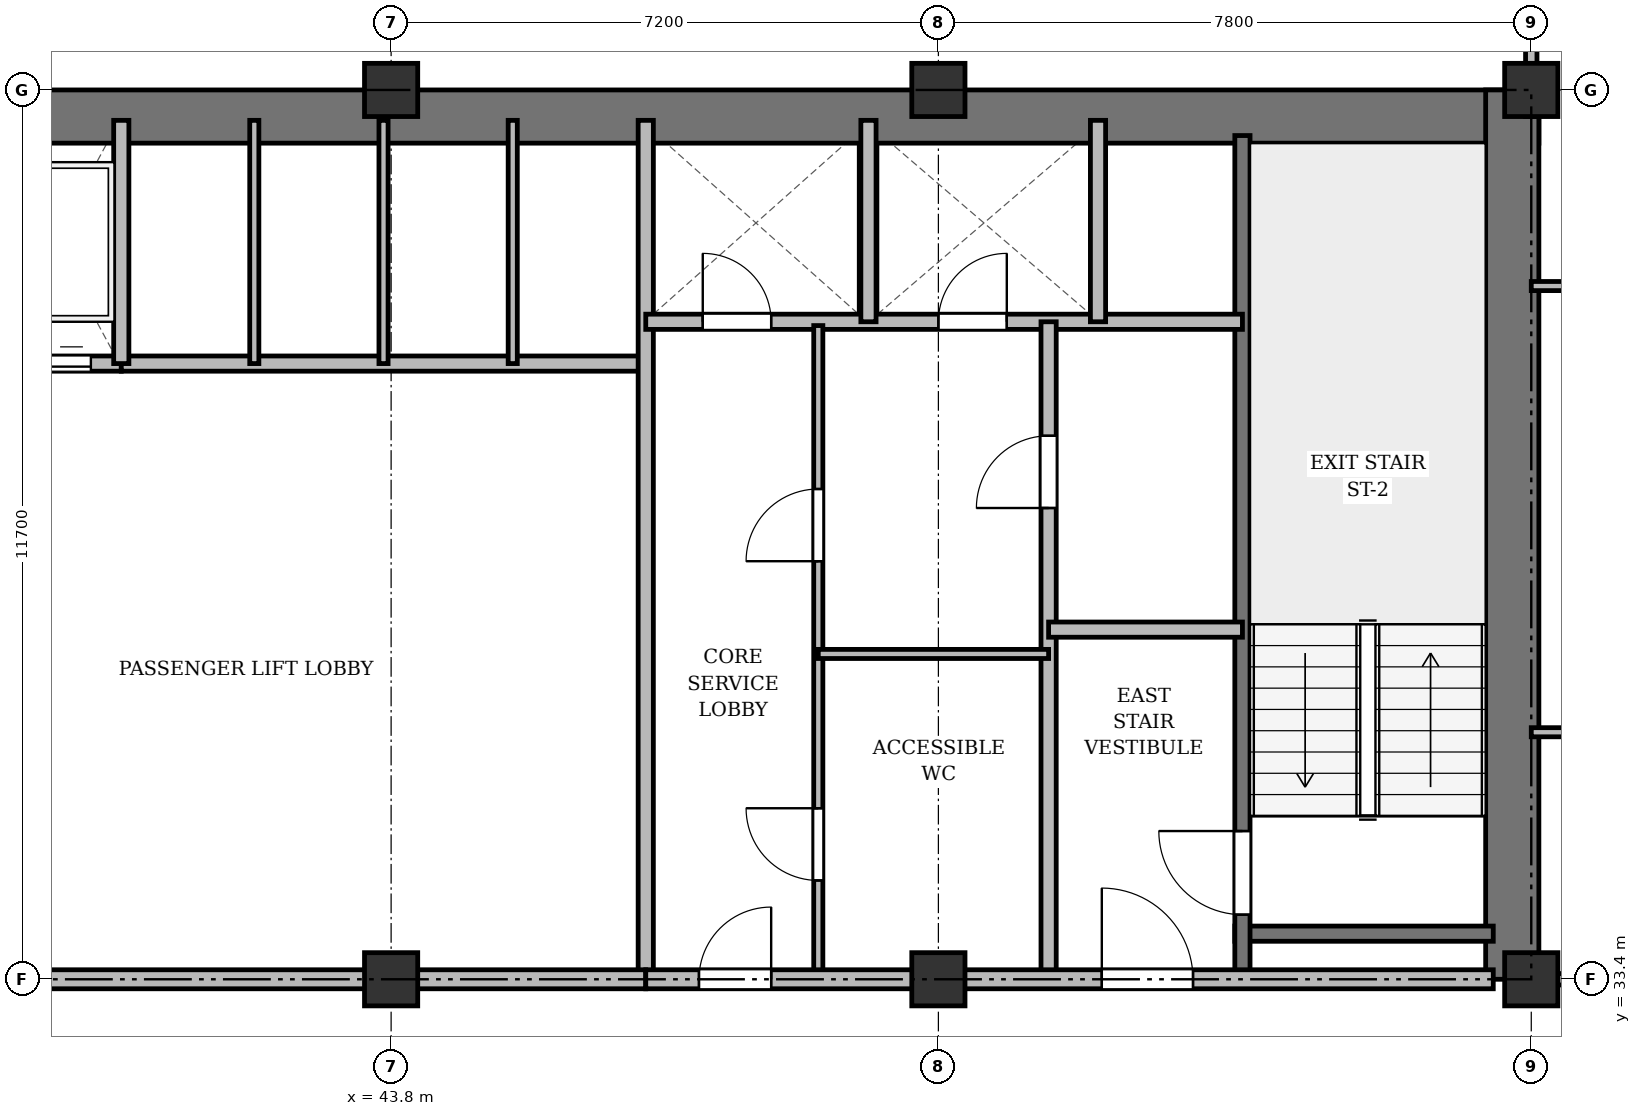
"""IFC4 building model, lengths in metres.
Left out: names, types, materials, properties, quantities, classifications, styles, units other than length and angle.
Written with IfcOpenShell. Run it as: python <this file> out.ifc"""

import sys

from ifc_helpers import new_model, si_unit, direction, frame, frame_2d, origin, origin_2d, place, context, subcontext, project, spatial, rectangle, extrude, source, transform, mapped, element, fill, save


model = new_model("IFC4")
c1 = context("Model", 3, precision=1e-05, world=origin(), true_north=direction((0.0, 1.0)))
c2 = subcontext(c1, "Body", "Model", "MODEL_VIEW")
j1 = project(units=[si_unit("LENGTHUNIT", "METRE"), si_unit("PLANEANGLEUNIT", "RADIAN")], contexts=[c1])
p1 = place(None, origin())
s1 = spatial("IfcSite", under=j1, at=p1, CompositionType="ELEMENT")
p2 = place(p1, origin())
s2 = spatial("IfcBuilding", under=s1, at=p2, CompositionType="ELEMENT")
p3 = place(p2, frame((0.0, 0.0, 135.7)))
s3 = spatial("IfcBuildingStorey", under=s2, at=p3, CompositionType="ELEMENT", Elevation=135.7)
m1 = source(origin(), c2, "Body", "SweptSolid", [
    extrude(rectangle(XDim=0.7, YDim=0.7, at=origin_2d()), origin(), (0.0, 0.0, 1.0), 3.6),
])
for number, where, z_axis, x_axis in (
    (1, (43.8, 33.4, 0.0), (0.0, 0.0, 1.0), (1.0, 0.0, 0.0)),
    (2, (43.8, 45.1, 0.0), (0.0, 0.0, 1.0), (1.0, 0.0, 0.0)),
    (3, (51.0, 33.4, 0.0), (0.0, 0.0, 1.0), (1.0, 0.0, 0.0)),
    (4, (51.0, 45.1, 0.0), (0.0, 0.0, 1.0), (1.0, 0.0, 0.0)),
    (5, (58.8, 33.4, 0.0), (0.0, 0.0, 1.0), (1.0, 0.0, 0.0)),
    (6, (58.8, 45.1, 0.0), (0.0, 0.0, 1.0), (1.0, 0.0, 0.0)),
):
    element("IfcColumn", number, at=place(p3, frame(where, z_axis=z_axis, x_axis=x_axis)), inside=s3, PredefinedType="COLUMN", context=c2, shape_type="MappedRepresentation", body=[
        mapped(m1, transform((0.0, 0.0, 0.0), x_axis=(1.0, 0.0, 0.0), y_axis=(0.0, 1.0, 0.0), z_axis=(0.0, 0.0, 1.0), scale=1.0)),
    ])
p4 = place(p3, frame((15.5, 44.75, 0.0), z_axis=(0.0, 0.0, 1.0), x_axis=(1.0, 0.0, 0.0)))
e7 = element("IfcWall", 7, at=p4, inside=s3, PredefinedType="SHEAR", context=c2, shape_type="SweptSolid", body=[
    extrude(rectangle(XDim=43.4, YDim=0.7, at=frame_2d((21.7, 0.0))), origin(), (0.0, 0.0, 1.0), 3.35),
])
p5 = place(p3, frame((58.55, 33.4, 0.0), z_axis=(0.0, 0.0, 1.0), x_axis=(0.0, 1.0, 0.0)))
e8 = element("IfcWall", 8, at=p5, inside=s3, PredefinedType="SHEAR", context=c2, shape_type="SweptSolid", body=[
    extrude(rectangle(XDim=11.7, YDim=0.7, at=frame_2d((5.85, 0.0))), origin(), (0.0, 0.0, 1.0), 3.35),
])
p6 = place(p3, frame((54.9, 34.0, 0.0), z_axis=(0.0, 0.0, 1.0), x_axis=(1.0, 0.0, 0.0)))
e9 = element("IfcWall", 9, at=p6, inside=s3, PredefinedType="SHEAR", context=c2, shape_type="SweptSolid", body=[
    extrude(rectangle(XDim=3.4, YDim=0.2, at=frame_2d((1.7, 0.0))), origin(), (0.0, 0.0, 1.0), 3.35),
])
p7 = place(p3, frame((55.0, 33.4, 0.0), z_axis=(0.0, 0.0, 1.0), x_axis=(0.0, 1.0, 0.0)))
e10 = element("IfcWall", 10, at=p7, inside=s3, PredefinedType="SHEAR", context=c2, shape_type="SweptSolid", body=[
    extrude(rectangle(XDim=11.1, YDim=0.2, at=frame_2d((5.55, 0.0))), origin(), (0.0, 0.0, 1.0), 3.35),
])
p8 = place(p7, frame((0.85, 0.0, 0.0)))
e11 = element("IfcOpeningElement", 11, at=p8, cuts=e10, PredefinedType="OPENING", context=c2, shape_type="SweptSolid", body=[
    extrude(rectangle(XDim=1.1, YDim=2.15, at=frame_2d((0.55, 1.075))), frame((0.0, 0.11, 0.0), z_axis=(0.0, -1.0, 0.0), x_axis=(1.0, 0.0, 0.0)), (0.0, 0.0, 1.0), 0.22),
])
p9 = place(p3, frame((33.35, 41.5, 0.0), z_axis=(0.0, 0.0, 1.0), x_axis=(1.0, 0.0, 0.0)))
e12 = element("IfcWall", 12, at=p9, inside=s3, PredefinedType="SOLIDWALL", context=c2, shape_type="SweptSolid", body=[
    extrude(rectangle(XDim=6.9, YDim=0.2, at=frame_2d((3.45, 0.0))), origin(), (0.0, 0.0, 1.0), 3.35),
])
p10 = place(p9, frame((0.35, 0.0, 0.0)))
e13 = element("IfcOpeningElement", 13, at=p10, cuts=e12, PredefinedType="OPENING", context=c2, shape_type="SweptSolid", body=[
    extrude(rectangle(XDim=1.05, YDim=2.15, at=frame_2d((0.525, 1.075))), frame((0.0, 0.11, 0.0), z_axis=(0.0, -1.0, 0.0), x_axis=(1.0, 0.0, 0.0)), (0.0, 0.0, 1.0), 0.22),
])
p11 = place(p9, frame((2.05, 0.0, 0.0)))
e14 = element("IfcOpeningElement", 14, at=p11, cuts=e12, PredefinedType="OPENING", context=c2, shape_type="SweptSolid", body=[
    extrude(rectangle(XDim=1.05, YDim=2.15, at=frame_2d((0.525, 1.075))), frame((0.0, 0.11, 0.0), z_axis=(0.0, -1.0, 0.0), x_axis=(1.0, 0.0, 0.0)), (0.0, 0.0, 1.0), 0.22),
])
p12 = place(p9, frame((3.75, 0.0, 0.0)))
e15 = element("IfcOpeningElement", 15, at=p12, cuts=e12, PredefinedType="OPENING", context=c2, shape_type="SweptSolid", body=[
    extrude(rectangle(XDim=1.05, YDim=2.15, at=frame_2d((0.525, 1.075))), frame((0.0, 0.11, 0.0), z_axis=(0.0, -1.0, 0.0), x_axis=(1.0, 0.0, 0.0)), (0.0, 0.0, 1.0), 0.22),
])
p13 = place(p9, frame((5.45, 0.0, 0.0)))
e16 = element("IfcOpeningElement", 16, at=p13, cuts=e12, PredefinedType="OPENING", context=c2, shape_type="SweptSolid", body=[
    extrude(rectangle(XDim=1.05, YDim=2.15, at=frame_2d((0.525, 1.075))), frame((0.0, 0.11, 0.0), z_axis=(0.0, -1.0, 0.0), x_axis=(1.0, 0.0, 0.0)), (0.0, 0.0, 1.0), 0.22),
])
p14 = place(p3, frame((40.25, 41.5, 0.0), z_axis=(0.0, 0.0, 1.0), x_axis=(1.0, 0.0, 0.0)))
e17 = element("IfcWall", 17, at=p14, inside=s3, PredefinedType="SOLIDWALL", context=c2, shape_type="SweptSolid", body=[
    extrude(rectangle(XDim=6.9, YDim=0.2, at=frame_2d((3.45, 0.0))), origin(), (0.0, 0.0, 1.0), 2.85),
])
p15 = place(p3, frame((40.25, 41.5, 0.0), z_axis=(0.0, 0.0, 1.0), x_axis=(0.0, 1.0, 0.0)))
e18 = element("IfcWall", 18, at=p15, inside=s3, PredefinedType="SOLIDWALL", context=c2, shape_type="SweptSolid", body=[
    extrude(rectangle(XDim=3.2, YDim=0.2, at=frame_2d((1.6, 0.0))), origin(), (0.0, 0.0, 1.0), 3.35),
])
p16 = place(p3, frame((42.0, 41.5, 0.0), z_axis=(0.0, 0.0, 1.0), x_axis=(0.0, 1.0, 0.0)))
e19 = element("IfcWall", 19, at=p16, inside=s3, PredefinedType="PARTITIONING", context=c2, shape_type="SweptSolid", body=[
    extrude(rectangle(XDim=3.2, YDim=0.12, at=frame_2d((1.6, 0.0))), origin(), (0.0, 0.0, 1.0), 3.35),
])
p17 = place(p3, frame((43.7, 41.5, 0.0), z_axis=(0.0, 0.0, 1.0), x_axis=(0.0, 1.0, 0.0)))
e20 = element("IfcWall", 20, at=p17, inside=s3, PredefinedType="PARTITIONING", context=c2, shape_type="SweptSolid", body=[
    extrude(rectangle(XDim=3.2, YDim=0.12, at=frame_2d((1.6, 0.0))), origin(), (0.0, 0.0, 1.0), 2.85),
])
p18 = place(p3, frame((45.4, 41.5, 0.0), z_axis=(0.0, 0.0, 1.0), x_axis=(0.0, 1.0, 0.0)))
e21 = element("IfcWall", 21, at=p18, inside=s3, PredefinedType="PARTITIONING", context=c2, shape_type="SweptSolid", body=[
    extrude(rectangle(XDim=3.2, YDim=0.12, at=frame_2d((1.6, 0.0))), origin(), (0.0, 0.0, 1.0), 3.35),
])
p19 = place(p3, frame((47.15, 33.4, 0.0), z_axis=(0.0, 0.0, 1.0), x_axis=(0.0, 1.0, 0.0)))
e22 = element("IfcWall", 22, at=p19, inside=s3, PredefinedType="SOLIDWALL", context=c2, shape_type="SweptSolid", body=[
    extrude(rectangle(XDim=11.3, YDim=0.2, at=frame_2d((5.65, 0.0))), origin(), (0.0, 0.0, 1.0), 2.75),
])
p20 = place(p3, frame((33.3, 33.4, 0.0), z_axis=(0.0, 0.0, 1.0), x_axis=(1.0, 0.0, 0.0)))
e23 = element("IfcWall", 23, at=p20, inside=s3, PredefinedType="PARTITIONING", context=c2, shape_type="SweptSolid", body=[
    extrude(rectangle(XDim=13.85, YDim=0.25, at=frame_2d((6.925, 0.0))), origin(), (0.0, 0.0, 1.0), 2.75),
])
p21 = place(p20, frame((4.2, 0.0, 0.0)))
e24 = element("IfcOpeningElement", 24, at=p21, cuts=e23, PredefinedType="OPENING", context=c2, shape_type="SweptSolid", body=[
    extrude(rectangle(XDim=1.6, YDim=2.2, at=frame_2d((0.8, 1.1))), frame((0.0, 0.135, 0.0), z_axis=(0.0, -1.0, 0.0), x_axis=(1.0, 0.0, 0.0)), (0.0, 0.0, 1.0), 0.27),
])
p22 = place(p3, frame((47.15, 42.05, 0.0), z_axis=(0.0, 0.0, 1.0), x_axis=(1.0, 0.0, 0.0)))
e25 = element("IfcWall", 25, at=p22, inside=s3, PredefinedType="SOLIDWALL", context=c2, shape_type="SweptSolid", body=[
    extrude(rectangle(XDim=7.85, YDim=0.2, at=frame_2d((3.925, 0.0))), origin(), (0.0, 0.0, 1.0), 2.85),
])
p23 = place(p22, frame((0.75, 0.0, 0.0)))
e26 = element("IfcOpeningElement", 26, at=p23, cuts=e25, PredefinedType="OPENING", context=c2, shape_type="SweptSolid", body=[
    extrude(rectangle(XDim=0.9, YDim=2.1, at=frame_2d((0.45, 1.05))), frame((0.0, 0.11, 0.0), z_axis=(0.0, -1.0, 0.0), x_axis=(1.0, 0.0, 0.0)), (0.0, 0.0, 1.0), 0.22),
])
p24 = place(p22, frame((3.85, 0.0, 0.0)))
e27 = element("IfcOpeningElement", 27, at=p24, cuts=e25, PredefinedType="OPENING", context=c2, shape_type="SweptSolid", body=[
    extrude(rectangle(XDim=0.9, YDim=2.1, at=frame_2d((0.45, 1.05))), frame((0.0, 0.11, 0.0), z_axis=(0.0, -1.0, 0.0), x_axis=(1.0, 0.0, 0.0)), (0.0, 0.0, 1.0), 0.22),
])
for number, where, z_axis, x_axis in (
    (28, (50.08, 42.05, 0.0), (0.0, 0.0, 1.0), (0.0, 1.0, 0.0)),
    (29, (53.1, 42.05, 0.0), (0.0, 0.0, 1.0), (0.0, 1.0, 0.0)),
):
    element("IfcWall", number, at=place(p3, frame(where, z_axis=z_axis, x_axis=x_axis)), inside=s3, PredefinedType="SOLIDWALL", context=c2, shape_type="SweptSolid", body=[
        extrude(rectangle(XDim=2.65, YDim=0.2, at=frame_2d((1.325, 0.0))), origin(), (0.0, 0.0, 1.0), 3.35),
    ])
p25 = place(p3, frame((52.45, 33.4, 0.0), z_axis=(0.0, 0.0, 1.0), x_axis=(0.0, 1.0, 0.0)))
e30 = element("IfcWall", 30, at=p25, inside=s3, PredefinedType="PARTITIONING", context=c2, shape_type="SweptSolid", body=[
    extrude(rectangle(XDim=8.65, YDim=0.2, at=frame_2d((4.325, 0.0))), origin(), (0.0, 0.0, 1.0), 2.75),
])
p26 = place(p25, frame((6.2, 0.0, 0.0)))
e31 = element("IfcOpeningElement", 31, at=p26, cuts=e30, PredefinedType="OPENING", context=c2, shape_type="SweptSolid", body=[
    extrude(rectangle(XDim=0.95, YDim=2.15, at=frame_2d((0.475, 1.075))), frame((0.0, 0.11, 0.0), z_axis=(0.0, -1.0, 0.0), x_axis=(1.0, 0.0, 0.0)), (0.0, 0.0, 1.0), 0.22),
])
p27 = place(p3, frame((52.45, 38.0, 0.0), z_axis=(0.0, 0.0, 1.0), x_axis=(1.0, 0.0, 0.0)))
e32 = element("IfcWall", 32, at=p27, inside=s3, PredefinedType="PARTITIONING", context=c2, shape_type="SweptSolid", body=[
    extrude(rectangle(XDim=2.55, YDim=0.2, at=frame_2d((1.275, 0.0))), origin(), (0.0, 0.0, 1.0), 3.35),
])
p28 = place(p3, frame((49.42, 33.4, 0.0), z_axis=(0.0, 0.0, 1.0), x_axis=(0.0, 1.0, 0.0)))
e33 = element("IfcWall", 33, at=p28, inside=s3, PredefinedType="PARTITIONING", context=c2, shape_type="SweptSolid", body=[
    extrude(rectangle(XDim=8.6, YDim=0.12, at=frame_2d((4.3, 0.0))), origin(), (0.0, 0.0, 1.0), 2.75),
])
p29 = place(p28, frame((1.3, 0.0, 0.0)))
e34 = element("IfcOpeningElement", 34, at=p29, cuts=e33, PredefinedType="OPENING", context=c2, shape_type="SweptSolid", body=[
    extrude(rectangle(XDim=0.95, YDim=2.15, at=frame_2d((0.475, 1.075))), frame((0.0, 0.07, 0.0), z_axis=(0.0, -1.0, 0.0), x_axis=(1.0, 0.0, 0.0)), (0.0, 0.0, 1.0), 0.14),
])
p30 = place(p28, frame((5.5, 0.0, 0.0)))
e35 = element("IfcOpeningElement", 35, at=p30, cuts=e33, PredefinedType="OPENING", context=c2, shape_type="SweptSolid", body=[
    extrude(rectangle(XDim=0.95, YDim=2.15, at=frame_2d((0.475, 1.075))), frame((0.0, 0.07, 0.0), z_axis=(0.0, -1.0, 0.0), x_axis=(1.0, 0.0, 0.0)), (0.0, 0.0, 1.0), 0.14),
])
p31 = place(p3, frame((49.42, 37.68, 0.0), z_axis=(0.0, 0.0, 1.0), x_axis=(1.0, 0.0, 0.0)))
e36 = element("IfcWall", 36, at=p31, inside=s3, PredefinedType="PARTITIONING", context=c2, shape_type="SweptSolid", body=[
    extrude(rectangle(XDim=3.03, YDim=0.12, at=frame_2d((1.515, 0.0))), origin(), (0.0, 0.0, 1.0), 2.85),
])
p32 = place(p3, frame((47.15, 33.4, 0.0), z_axis=(0.0, 0.0, 1.0), x_axis=(1.0, 0.0, 0.0)))
e37 = element("IfcWall", 37, at=p32, inside=s3, PredefinedType="PARTITIONING", context=c2, shape_type="SweptSolid", body=[
    extrude(rectangle(XDim=11.15, YDim=0.25, at=frame_2d((5.575, 0.0))), origin(), (0.0, 0.0, 1.0), 2.75),
])
p33 = place(p32, frame((0.7, 0.0, 0.0)))
e38 = element("IfcOpeningElement", 38, at=p33, cuts=e37, PredefinedType="OPENING", context=c2, shape_type="SweptSolid", body=[
    extrude(rectangle(XDim=0.95, YDim=2.15, at=frame_2d((0.475, 1.075))), frame((0.0, 0.135, 0.0), z_axis=(0.0, -1.0, 0.0), x_axis=(1.0, 0.0, 0.0)), (0.0, 0.0, 1.0), 0.27),
])
p34 = place(p32, frame((6.0, 0.0, 0.0)))
e39 = element("IfcOpeningElement", 39, at=p34, cuts=e37, PredefinedType="OPENING", context=c2, shape_type="SweptSolid", body=[
    extrude(rectangle(XDim=1.2, YDim=2.15, at=frame_2d((0.6, 1.075))), frame((0.0, 0.135, 0.0), z_axis=(0.0, -1.0, 0.0), x_axis=(1.0, 0.0, 0.0)), (0.0, 0.0, 1.0), 0.27),
])
p35 = place(p3, frame((58.8, 36.65, 0.0), z_axis=(0.0, 0.0, 1.0), x_axis=(1.0, 0.0, 0.0)))
e40 = element("IfcWall", 40, at=p35, inside=s3, PredefinedType="PARTITIONING", context=c2, shape_type="SweptSolid", body=[
    extrude(rectangle(XDim=2.45, YDim=0.12, at=frame_2d((1.225, 0.0))), origin(), (0.0, 0.0, 1.0), 2.85),
])
p36 = place(p3, frame((58.8, 42.52, 0.0), z_axis=(0.0, 0.0, 1.0), x_axis=(1.0, 0.0, 0.0)))
e41 = element("IfcWall", 41, at=p36, inside=s3, PredefinedType="PARTITIONING", context=c2, shape_type="SweptSolid", body=[
    extrude(rectangle(XDim=3.775, YDim=0.12, at=frame_2d((1.887, 0.0))), origin(), (0.0, 0.0, 1.0), 2.85),
])
p37 = place(p36, frame((1.506, 0.0, 0.0)))
e42 = element("IfcOpeningElement", 42, at=p37, cuts=e41, PredefinedType="OPENING", context=c2, shape_type="SweptSolid", body=[
    extrude(rectangle(XDim=0.95, YDim=2.15, at=frame_2d((0.475, 1.075))), frame((0.0, 0.07, 0.0), z_axis=(0.0, -1.0, 0.0), x_axis=(1.0, 0.0, 0.0)), (0.0, 0.0, 1.0), 0.14),
])
p38 = place(p3, frame((58.8, 33.4, 0.0), z_axis=(0.0, 0.0, 1.0), x_axis=(1.0, 0.0, 0.0)))
e43 = element("IfcWall", 43, at=p38, inside=s3, PredefinedType="PARTITIONING", context=c2, shape_type="SweptSolid", body=[
    extrude(rectangle(XDim=7.55, YDim=0.15, at=frame_2d((3.775, 0.0))), origin(), (0.0, 0.0, 1.0), 2.75),
])
p39 = place(p38, frame((4.375, 0.0, 0.0)))
e44 = element("IfcOpeningElement", 44, at=p39, cuts=e43, PredefinedType="OPENING", context=c2, shape_type="SweptSolid", body=[
    extrude(rectangle(XDim=0.95, YDim=2.15, at=frame_2d((0.475, 1.075))), frame((0.0, 0.085, 0.0), z_axis=(0.0, -1.0, 0.0), x_axis=(1.0, 0.0, 0.0)), (0.0, 0.0, 1.0), 0.17),
])
p40 = place(p3, frame((58.8, 44.75, 0.0), z_axis=(0.0, 0.0, 1.0), x_axis=(0.0, 1.0, 0.0)))
e45 = element("IfcWall", 45, at=p40, inside=s3, PredefinedType="PARTITIONING", context=c2, shape_type="SweptSolid", body=[
    extrude(rectangle(XDim=3.61, YDim=0.15, at=frame_2d((1.805, 0.0))), origin(), (0.0, 0.0, 1.0), 2.85),
])
p41 = place(p40, frame((1.1, 0.0, 0.0)))
e46 = element("IfcOpeningElement", 46, at=p41, cuts=e45, PredefinedType="OPENING", context=c2, shape_type="SweptSolid", body=[
    extrude(rectangle(XDim=0.95, YDim=2.15, at=frame_2d((0.475, 1.075))), frame((0.0, 0.085, 0.0), z_axis=(0.0, -1.0, 0.0), x_axis=(1.0, 0.0, 0.0)), (0.0, 0.0, 1.0), 0.17),
])
m2 = source(origin(), c2, "Body", "SweptSolid", [
    extrude(rectangle(XDim=1.1, YDim=2.15, at=frame_2d((0.55, 1.075))), frame((0.0, 0.025, 0.0), z_axis=(0.0, -1.0, 0.0), x_axis=(1.0, 0.0, 0.0)), (0.0, 0.0, 1.0), 0.05),
])
p42 = place(p8, origin())
e47 = element("IfcDoor", 47, at=p42, inside=s3, OperationType="SINGLE_SWING_RIGHT", PredefinedType="DOOR", context=c2, shape_type="MappedRepresentation", body=[
    mapped(m2, transform((0.0, 0.0, 0.0), x_axis=(1.0, 0.0, 0.0), y_axis=(0.0, 1.0, 0.0), z_axis=(0.0, 0.0, 1.0), scale=1.0)),
])
fill(e11, e47)
m3 = source(origin(), c2, "Body", "SweptSolid", [
    extrude(rectangle(XDim=1.05, YDim=2.15, at=frame_2d((0.525, 1.075))), frame((0.0, 0.025, 0.0), z_axis=(0.0, -1.0, 0.0), x_axis=(1.0, 0.0, 0.0)), (0.0, 0.0, 1.0), 0.05),
])
p43 = place(p13, origin())
e48 = element("IfcDoor", 48, at=p43, inside=s3, OperationType="DOUBLE_DOOR_SLIDING", PredefinedType="DOOR", context=c2, shape_type="MappedRepresentation", body=[
    mapped(m3, transform((0.0, 0.0, 0.0), x_axis=(1.0, 0.0, 0.0), y_axis=(0.0, 1.0, 0.0), z_axis=(0.0, 0.0, 1.0), scale=1.0)),
])
fill(e16, e48)
m4 = source(origin(), c2, "Body", "SweptSolid", [
    extrude(rectangle(XDim=0.9, YDim=2.1, at=frame_2d((0.45, 1.05))), frame((0.0, 0.025, 0.0), z_axis=(0.0, -1.0, 0.0), x_axis=(1.0, 0.0, 0.0)), (0.0, 0.0, 1.0), 0.05),
])
p44 = place(p23, origin())
e49 = element("IfcDoor", 49, at=p44, inside=s3, OperationType="SINGLE_SWING_LEFT", PredefinedType="DOOR", context=c2, shape_type="MappedRepresentation", body=[
    mapped(m4, transform((0.0, 0.0, 0.0), x_axis=(1.0, 0.0, 0.0), y_axis=(0.0, 1.0, 0.0), z_axis=(0.0, 0.0, 1.0), scale=1.0)),
])
fill(e26, e49)
p45 = place(p24, origin())
e50 = element("IfcDoor", 50, at=p45, inside=s3, OperationType="SINGLE_SWING_RIGHT", PredefinedType="DOOR", context=c2, shape_type="MappedRepresentation", body=[
    mapped(m4, transform((0.0, 0.0, 0.0), x_axis=(1.0, 0.0, 0.0), y_axis=(0.0, 1.0, 0.0), z_axis=(0.0, 0.0, 1.0), scale=1.0)),
])
fill(e27, e50)
m5 = source(origin(), c2, "Body", "SweptSolid", [
    extrude(rectangle(XDim=0.95, YDim=2.15, at=frame_2d((0.475, 1.075))), frame((0.0, 0.025, 0.0), z_axis=(0.0, -1.0, 0.0), x_axis=(1.0, 0.0, 0.0)), (0.0, 0.0, 1.0), 0.05),
])
p46 = place(p26, origin())
e51 = element("IfcDoor", 51, at=p46, inside=s3, OperationType="SINGLE_SWING_LEFT", PredefinedType="DOOR", context=c2, shape_type="MappedRepresentation", body=[
    mapped(m5, transform((0.0, 0.0, 0.0), x_axis=(1.0, 0.0, 0.0), y_axis=(0.0, 1.0, 0.0), z_axis=(0.0, 0.0, 1.0), scale=1.0)),
])
fill(e31, e51)
p47 = place(p29, origin())
e52 = element("IfcDoor", 52, at=p47, inside=s3, OperationType="SINGLE_SWING_RIGHT", PredefinedType="DOOR", context=c2, shape_type="MappedRepresentation", body=[
    mapped(m5, transform((0.0, 0.0, 0.0), x_axis=(1.0, 0.0, 0.0), y_axis=(0.0, 1.0, 0.0), z_axis=(0.0, 0.0, 1.0), scale=1.0)),
])
fill(e34, e52)
p48 = place(p30, origin())
e53 = element("IfcDoor", 53, at=p48, inside=s3, OperationType="SINGLE_SWING_LEFT", PredefinedType="DOOR", context=c2, shape_type="MappedRepresentation", body=[
    mapped(m5, transform((0.0, 0.0, 0.0), x_axis=(1.0, 0.0, 0.0), y_axis=(0.0, 1.0, 0.0), z_axis=(0.0, 0.0, 1.0), scale=1.0)),
])
fill(e35, e53)
p49 = place(p33, origin())
e54 = element("IfcDoor", 54, at=p49, inside=s3, OperationType="SINGLE_SWING_RIGHT", PredefinedType="DOOR", context=c2, shape_type="MappedRepresentation", body=[
    mapped(m5, transform((0.0, 0.0, 0.0), x_axis=(1.0, 0.0, 0.0), y_axis=(0.0, 1.0, 0.0), z_axis=(0.0, 0.0, 1.0), scale=1.0)),
])
fill(e38, e54)
m6 = source(origin(), c2, "Body", "SweptSolid", [
    extrude(rectangle(XDim=1.2, YDim=2.15, at=frame_2d((0.6, 1.075))), frame((0.0, 0.025, 0.0), z_axis=(0.0, -1.0, 0.0), x_axis=(1.0, 0.0, 0.0)), (0.0, 0.0, 1.0), 0.05),
])
p50 = place(p34, origin())
e55 = element("IfcDoor", 55, at=p50, inside=s3, OperationType="SINGLE_SWING_LEFT", PredefinedType="DOOR", context=c2, shape_type="MappedRepresentation", body=[
    mapped(m6, transform((0.0, 0.0, 0.0), x_axis=(1.0, 0.0, 0.0), y_axis=(0.0, 1.0, 0.0), z_axis=(0.0, 0.0, 1.0), scale=1.0)),
])
fill(e39, e55)
save(model, sys.argv[1])
